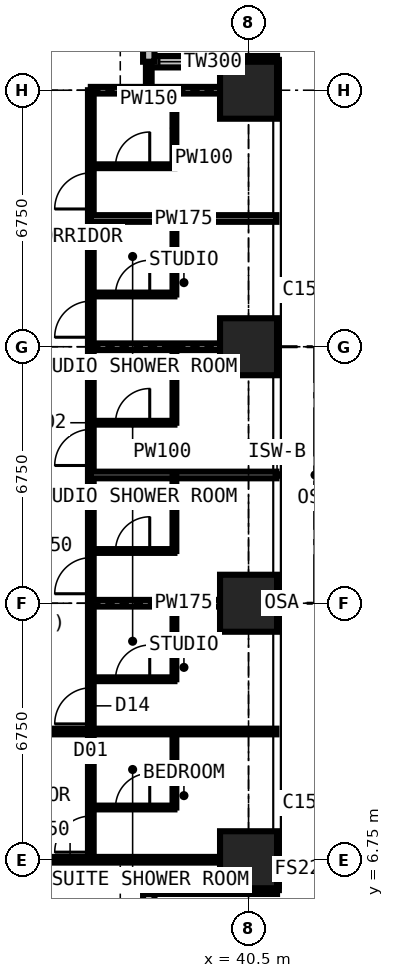
"""IFC4 building model, lengths in metres.
Left out: names, types, materials, properties, quantities, classifications, styles, units other than length and angle.
Written with IfcOpenShell. Run it as: python <this file> out.ifc"""

import sys

from ifc_helpers import new_model, si_unit, direction, frame, frame_2d, origin, origin_2d, place, context, subcontext, project, spatial, rectangle, extrude, element, fill, save


model = new_model("IFC4")
c1 = context("Model", 3, precision=1e-05, world=origin(), true_north=direction((0.0, 1.0)))
c2 = subcontext(c1, "Body", "Model", "MODEL_VIEW")
j1 = project(units=[si_unit("LENGTHUNIT", "METRE"), si_unit("PLANEANGLEUNIT", "RADIAN")], contexts=[c1])
p1 = place(None, origin())
s1 = spatial("IfcSite", under=j1, at=p1, CompositionType="ELEMENT")
p2 = place(p1, origin())
s2 = spatial("IfcBuilding", under=s1, at=p2, CompositionType="ELEMENT")
p3 = place(p2, frame((0.0, 0.0, 126.9)))
s3 = spatial("IfcBuildingStorey", under=s2, at=p3, CompositionType="ELEMENT", Elevation=126.9)
for number, where, z_axis, x_axis in (
    (1, (40.5, 6.75, 0.0), (0.0, 0.0, 1.0), (1.0, 0.0, 0.0)),
    (2, (40.5, 13.5, 0.0), (0.0, 0.0, 1.0), (1.0, 0.0, 0.0)),
    (3, (40.5, 20.25, 0.0), (0.0, 0.0, 1.0), (1.0, 0.0, 0.0)),
    (4, (40.5, 27.0, 0.0), (0.0, 0.0, 1.0), (1.0, 0.0, 0.0)),
):
    element("IfcColumn", number, at=place(p3, frame(where, z_axis=z_axis, x_axis=x_axis)), inside=s3, PredefinedType="COLUMN", context=c2, shape_type="SweptSolid", body=[
        extrude(rectangle(XDim=1.5, YDim=1.5, at=origin_2d()), origin(), (0.0, 0.0, 1.0), 3.6),
    ])
p4 = place(p3, frame((41.25, 27.75, 0.0), z_axis=(0.0, 0.0, 1.0), x_axis=(-1.0, 0.0, 0.0)))
e5 = element("IfcWall", 5, at=p4, inside=s3, PredefinedType="SOLIDWALL", context=c2, shape_type="SweptSolid", body=[
    extrude(rectangle(XDim=3.375, YDim=0.3, at=frame_2d((1.688, 0.0))), origin(), (0.0, 0.0, 1.0), 3.375),
])
p5 = place(p4, frame((1.607, 0.0, 0.9)))
e6 = element("IfcOpeningElement", 6, at=p5, cuts=e5, PredefinedType="OPENING", context=c2, shape_type="SweptSolid", body=[
    extrude(rectangle(XDim=1.5, YDim=1.8, at=frame_2d((0.75, 0.9))), frame((0.0, 0.16, 0.0), z_axis=(0.0, -1.0, 0.0), x_axis=(1.0, 0.0, 0.0)), (0.0, 0.0, 1.0), 0.32),
])
p6 = place(p3, frame((37.875, 27.75, 0.0), z_axis=(0.0, 0.0, 1.0), x_axis=(0.0, 1.0, 0.0)))
e7 = element("IfcWall", 7, at=p6, inside=s3, PredefinedType="SOLIDWALL", context=c2, shape_type="SweptSolid", body=[
    extrude(rectangle(XDim=3.375, YDim=0.3, at=frame_2d((1.688, 0.0))), origin(), (0.0, 0.0, 1.0), 3.375),
])
p7 = place(p6, frame((0.788, 0.0, 0.6)))
e8 = element("IfcOpeningElement", 8, at=p7, cuts=e7, PredefinedType="OPENING", context=c2, shape_type="SweptSolid", body=[
    extrude(rectangle(XDim=1.8, YDim=2.1, at=frame_2d((0.9, 1.05))), frame((0.0, 0.16, 0.0), z_axis=(0.0, -1.0, 0.0), x_axis=(1.0, 0.0, 0.0)), (0.0, 0.0, 1.0), 0.32),
])
p8 = place(p3, frame((37.875, 2.625, 0.0), z_axis=(0.0, 0.0, 1.0), x_axis=(0.0, 1.0, 0.0)))
e9 = element("IfcWall", 9, at=p8, inside=s3, PredefinedType="SOLIDWALL", context=c2, shape_type="SweptSolid", body=[
    extrude(rectangle(XDim=3.375, YDim=0.3, at=frame_2d((1.688, 0.0))), origin(), (0.0, 0.0, 1.0), 3.375),
])
p9 = place(p8, frame((0.788, 0.0, 0.6)))
e10 = element("IfcOpeningElement", 10, at=p9, cuts=e9, PredefinedType="OPENING", context=c2, shape_type="SweptSolid", body=[
    extrude(rectangle(XDim=1.8, YDim=2.1, at=frame_2d((0.9, 1.05))), frame((0.0, 0.16, 0.0), z_axis=(0.0, -1.0, 0.0), x_axis=(1.0, 0.0, 0.0)), (0.0, 0.0, 1.0), 0.32),
])
p10 = place(p3, frame((37.875, 6.0, 0.0), z_axis=(0.0, 0.0, 1.0), x_axis=(1.0, 0.0, 0.0)))
e11 = element("IfcWall", 11, at=p10, inside=s3, PredefinedType="SOLIDWALL", context=c2, shape_type="SweptSolid", body=[
    extrude(rectangle(XDim=3.375, YDim=0.3, at=frame_2d((1.688, 0.0))), origin(), (0.0, 0.0, 1.0), 3.375),
])
p11 = place(p10, frame((0.268, 0.0, 0.9)))
e12 = element("IfcOpeningElement", 12, at=p11, cuts=e11, PredefinedType="OPENING", context=c2, shape_type="SweptSolid", body=[
    extrude(rectangle(XDim=1.5, YDim=1.8, at=frame_2d((0.75, 0.9))), frame((0.0, 0.16, 0.0), z_axis=(0.0, -1.0, 0.0), x_axis=(1.0, 0.0, 0.0)), (0.0, 0.0, 1.0), 0.32),
])
p12 = place(p3, frame((30.375, 6.75, 0.0), z_axis=(0.0, 0.0, 1.0), x_axis=(1.0, 0.0, 0.0)))
e13 = element("IfcWall", 13, at=p12, inside=s3, PredefinedType="PARTITIONING", context=c2, shape_type="SweptSolid", body=[
    extrude(rectangle(XDim=10.859, YDim=0.15, at=frame_2d((5.429, 0.0))), origin(), (0.0, 0.0, 1.0), 2.877),
])
p13 = place(p12, frame((1.6, 0.0, 0.0)))
e14 = element("IfcOpeningElement", 14, at=p13, cuts=e13, PredefinedType="OPENING", context=c2, shape_type="SweptSolid", body=[
    extrude(rectangle(XDim=1.0, YDim=2.2, at=frame_2d((0.5, 1.1))), frame((0.0, 0.085, 0.0), z_axis=(0.0, -1.0, 0.0), x_axis=(1.0, 0.0, 0.0)), (0.0, 0.0, 1.0), 0.17),
])
p14 = place(p3, frame((30.375, 10.125, 0.0), z_axis=(0.0, 0.0, 1.0), x_axis=(1.0, 0.0, 0.0)))
e15 = element("IfcWall", 15, at=p14, inside=s3, PredefinedType="PARTITIONING", context=c2, shape_type="SweptSolid", body=[
    extrude(rectangle(XDim=10.859, YDim=0.15, at=frame_2d((5.429, 0.0))), origin(), (0.0, 0.0, 1.0), 3.375),
])
p15 = place(p14, frame((2.5, 0.0, 0.0)))
e16 = element("IfcOpeningElement", 16, at=p15, cuts=e15, PredefinedType="OPENING", context=c2, shape_type="SweptSolid", body=[
    extrude(rectangle(XDim=1.0, YDim=2.2, at=frame_2d((0.5, 1.1))), frame((0.0, 0.085, 0.0), z_axis=(0.0, -1.0, 0.0), x_axis=(1.0, 0.0, 0.0)), (0.0, 0.0, 1.0), 0.17),
])
p16 = place(p3, frame((36.35, 6.75, 0.0), z_axis=(0.0, 0.0, 1.0), x_axis=(0.0, 1.0, 0.0)))
e17 = element("IfcWall", 17, at=p16, inside=s3, PredefinedType="PARTITIONING", context=c2, shape_type="SweptSolid", body=[
    extrude(rectangle(XDim=20.25, YDim=0.15, at=frame_2d((10.125, 0.0))), origin(), (0.0, 0.0, 1.0), 3.375),
])
p17 = place(p16, frame((0.2, 0.0, 0.0)))
e18 = element("IfcOpeningElement", 18, at=p17, cuts=e17, PredefinedType="OPENING", context=c2, shape_type="SweptSolid", body=[
    extrude(rectangle(XDim=0.95, YDim=2.2, at=frame_2d((0.475, 1.1))), frame((0.0, 0.085, 0.0), z_axis=(0.0, -1.0, 0.0), x_axis=(1.0, 0.0, 0.0)), (0.0, 0.0, 1.0), 0.17),
])
p18 = place(p16, frame((3.575, 0.0, 0.0)))
e19 = element("IfcOpeningElement", 19, at=p18, cuts=e17, PredefinedType="OPENING", context=c2, shape_type="SweptSolid", body=[
    extrude(rectangle(XDim=0.95, YDim=2.2, at=frame_2d((0.475, 1.1))), frame((0.0, 0.085, 0.0), z_axis=(0.0, -1.0, 0.0), x_axis=(1.0, 0.0, 0.0)), (0.0, 0.0, 1.0), 0.17),
])
p19 = place(p16, frame((7.0, 0.0, 0.0)))
e20 = element("IfcOpeningElement", 20, at=p19, cuts=e17, PredefinedType="OPENING", context=c2, shape_type="SweptSolid", body=[
    extrude(rectangle(XDim=0.95, YDim=2.2, at=frame_2d((0.475, 1.1))), frame((0.0, 0.085, 0.0), z_axis=(0.0, -1.0, 0.0), x_axis=(1.0, 0.0, 0.0)), (0.0, 0.0, 1.0), 0.17),
])
p20 = place(p16, frame((10.375, 0.0, 0.0)))
e21 = element("IfcOpeningElement", 21, at=p20, cuts=e17, PredefinedType="OPENING", context=c2, shape_type="SweptSolid", body=[
    extrude(rectangle(XDim=0.95, YDim=2.2, at=frame_2d((0.475, 1.1))), frame((0.0, 0.085, 0.0), z_axis=(0.0, -1.0, 0.0), x_axis=(1.0, 0.0, 0.0)), (0.0, 0.0, 1.0), 0.17),
])
p21 = place(p16, frame((13.75, 0.0, 0.0)))
e22 = element("IfcOpeningElement", 22, at=p21, cuts=e17, PredefinedType="OPENING", context=c2, shape_type="SweptSolid", body=[
    extrude(rectangle(XDim=0.95, YDim=2.2, at=frame_2d((0.475, 1.1))), frame((0.0, 0.085, 0.0), z_axis=(0.0, -1.0, 0.0), x_axis=(1.0, 0.0, 0.0)), (0.0, 0.0, 1.0), 0.17),
])
p22 = place(p16, frame((17.125, 0.0, 0.0)))
e23 = element("IfcOpeningElement", 23, at=p22, cuts=e17, PredefinedType="OPENING", context=c2, shape_type="SweptSolid", body=[
    extrude(rectangle(XDim=0.95, YDim=2.2, at=frame_2d((0.475, 1.1))), frame((0.0, 0.085, 0.0), z_axis=(0.0, -1.0, 0.0), x_axis=(1.0, 0.0, 0.0)), (0.0, 0.0, 1.0), 0.17),
])
p23 = place(p3, frame((36.35, 8.125, 0.0), z_axis=(0.0, 0.0, 1.0), x_axis=(1.0, 0.0, 0.0)))
e24 = element("IfcWall", 24, at=p23, inside=s3, PredefinedType="PARTITIONING", context=c2, shape_type="SweptSolid", body=[
    extrude(rectangle(XDim=2.2, YDim=0.1, at=frame_2d((1.1, 0.0))), origin(), (0.0, 0.0, 1.0), 3.375),
])
p24 = place(p23, frame((0.65, 0.0, 0.0)))
e25 = element("IfcOpeningElement", 25, at=p24, cuts=e24, PredefinedType="OPENING", context=c2, shape_type="SweptSolid", body=[
    extrude(rectangle(XDim=0.9, YDim=2.2, at=frame_2d((0.45, 1.1))), frame((0.0, 0.06, 0.0), z_axis=(0.0, -1.0, 0.0), x_axis=(1.0, 0.0, 0.0)), (0.0, 0.0, 1.0), 0.12),
])
p25 = place(p3, frame((36.35, 11.5, 0.0), z_axis=(0.0, 0.0, 1.0), x_axis=(1.0, 0.0, 0.0)))
e26 = element("IfcWall", 26, at=p25, inside=s3, PredefinedType="PARTITIONING", context=c2, shape_type="SweptSolid", body=[
    extrude(rectangle(XDim=2.2, YDim=0.1, at=frame_2d((1.1, 0.0))), origin(), (0.0, 0.0, 1.0), 3.375),
])
p26 = place(p25, frame((0.65, 0.0, 0.0)))
e27 = element("IfcOpeningElement", 27, at=p26, cuts=e26, PredefinedType="OPENING", context=c2, shape_type="SweptSolid", body=[
    extrude(rectangle(XDim=0.9, YDim=2.2, at=frame_2d((0.45, 1.1))), frame((0.0, 0.06, 0.0), z_axis=(0.0, -1.0, 0.0), x_axis=(1.0, 0.0, 0.0)), (0.0, 0.0, 1.0), 0.12),
])
p27 = place(p3, frame((36.35, 13.5, 0.0), z_axis=(0.0, 0.0, 1.0), x_axis=(1.0, 0.0, 0.0)))
e28 = element("IfcWall", 28, at=p27, inside=s3, PredefinedType="PARTITIONING", context=c2, shape_type="SweptSolid", body=[
    extrude(rectangle(XDim=4.884, YDim=0.175, at=frame_2d((2.442, 0.0))), origin(), (0.0, 0.0, 1.0), 2.61),
])
p28 = place(p3, frame((36.35, 14.875, 0.0), z_axis=(0.0, 0.0, 1.0), x_axis=(1.0, 0.0, 0.0)))
e29 = element("IfcWall", 29, at=p28, inside=s3, PredefinedType="PARTITIONING", context=c2, shape_type="SweptSolid", body=[
    extrude(rectangle(XDim=2.2, YDim=0.1, at=frame_2d((1.1, 0.0))), origin(), (0.0, 0.0, 1.0), 3.375),
])
p29 = place(p28, frame((0.65, 0.0, 0.0)))
e30 = element("IfcOpeningElement", 30, at=p29, cuts=e29, PredefinedType="OPENING", context=c2, shape_type="SweptSolid", body=[
    extrude(rectangle(XDim=0.9, YDim=2.2, at=frame_2d((0.45, 1.1))), frame((0.0, 0.06, 0.0), z_axis=(0.0, -1.0, 0.0), x_axis=(1.0, 0.0, 0.0)), (0.0, 0.0, 1.0), 0.12),
])
p30 = place(p3, frame((36.35, 16.875, 0.0), z_axis=(0.0, 0.0, 1.0), x_axis=(1.0, 0.0, 0.0)))
e31 = element("IfcWall", 31, at=p30, inside=s3, PredefinedType="PARTITIONING", context=c2, shape_type="SweptSolid", body=[
    extrude(rectangle(XDim=4.884, YDim=0.175, at=frame_2d((2.442, 0.0))), origin(), (0.0, 0.0, 1.0), 3.375),
])
p31 = place(p3, frame((36.35, 18.25, 0.0), z_axis=(0.0, 0.0, 1.0), x_axis=(1.0, 0.0, 0.0)))
e32 = element("IfcWall", 32, at=p31, inside=s3, PredefinedType="PARTITIONING", context=c2, shape_type="SweptSolid", body=[
    extrude(rectangle(XDim=2.2, YDim=0.1, at=frame_2d((1.1, 0.0))), origin(), (0.0, 0.0, 1.0), 3.375),
])
p32 = place(p31, frame((0.65, 0.0, 0.0)))
e33 = element("IfcOpeningElement", 33, at=p32, cuts=e32, PredefinedType="OPENING", context=c2, shape_type="SweptSolid", body=[
    extrude(rectangle(XDim=0.9, YDim=2.2, at=frame_2d((0.45, 1.1))), frame((0.0, 0.06, 0.0), z_axis=(0.0, -1.0, 0.0), x_axis=(1.0, 0.0, 0.0)), (0.0, 0.0, 1.0), 0.12),
])
p33 = place(p3, frame((36.35, 20.25, 0.0), z_axis=(0.0, 0.0, 1.0), x_axis=(1.0, 0.0, 0.0)))
e34 = element("IfcWall", 34, at=p33, inside=s3, PredefinedType="PARTITIONING", context=c2, shape_type="SweptSolid", body=[
    extrude(rectangle(XDim=4.884, YDim=0.175, at=frame_2d((2.442, 0.0))), origin(), (0.0, 0.0, 1.0), 2.61),
])
p34 = place(p3, frame((36.35, 21.625, 0.0), z_axis=(0.0, 0.0, 1.0), x_axis=(1.0, 0.0, 0.0)))
e35 = element("IfcWall", 35, at=p34, inside=s3, PredefinedType="PARTITIONING", context=c2, shape_type="SweptSolid", body=[
    extrude(rectangle(XDim=2.2, YDim=0.1, at=frame_2d((1.1, 0.0))), origin(), (0.0, 0.0, 1.0), 3.375),
])
p35 = place(p34, frame((0.65, 0.0, 0.0)))
e36 = element("IfcOpeningElement", 36, at=p35, cuts=e35, PredefinedType="OPENING", context=c2, shape_type="SweptSolid", body=[
    extrude(rectangle(XDim=0.9, YDim=2.2, at=frame_2d((0.45, 1.1))), frame((0.0, 0.06, 0.0), z_axis=(0.0, -1.0, 0.0), x_axis=(1.0, 0.0, 0.0)), (0.0, 0.0, 1.0), 0.12),
])
p36 = place(p3, frame((36.35, 23.625, 0.0), z_axis=(0.0, 0.0, 1.0), x_axis=(1.0, 0.0, 0.0)))
e37 = element("IfcWall", 37, at=p36, inside=s3, PredefinedType="PARTITIONING", context=c2, shape_type="SweptSolid", body=[
    extrude(rectangle(XDim=4.884, YDim=0.175, at=frame_2d((2.442, 0.0))), origin(), (0.0, 0.0, 1.0), 3.375),
])
p37 = place(p3, frame((36.35, 25.0, 0.0), z_axis=(0.0, 0.0, 1.0), x_axis=(1.0, 0.0, 0.0)))
e38 = element("IfcWall", 38, at=p37, inside=s3, PredefinedType="PARTITIONING", context=c2, shape_type="SweptSolid", body=[
    extrude(rectangle(XDim=2.2, YDim=0.1, at=frame_2d((1.1, 0.0))), origin(), (0.0, 0.0, 1.0), 3.375),
])
p38 = place(p37, frame((0.65, 0.0, 0.0)))
e39 = element("IfcOpeningElement", 39, at=p38, cuts=e38, PredefinedType="OPENING", context=c2, shape_type="SweptSolid", body=[
    extrude(rectangle(XDim=0.9, YDim=2.2, at=frame_2d((0.45, 1.1))), frame((0.0, 0.06, 0.0), z_axis=(0.0, -1.0, 0.0), x_axis=(1.0, 0.0, 0.0)), (0.0, 0.0, 1.0), 0.12),
])
p39 = place(p3, frame((36.35, 27.0, 0.0), z_axis=(0.0, 0.0, 1.0), x_axis=(1.0, 0.0, 0.0)))
e40 = element("IfcWall", 40, at=p39, inside=s3, PredefinedType="PARTITIONING", context=c2, shape_type="SweptSolid", body=[
    extrude(rectangle(XDim=4.884, YDim=0.175, at=frame_2d((2.442, 0.0))), origin(), (0.0, 0.0, 1.0), 2.877),
])
p40 = place(p3, frame((37.875, 27.0, 0.0), z_axis=(0.0, 0.0, 1.0), x_axis=(0.0, 1.0, 0.0)))
e41 = element("IfcWall", 41, at=p40, inside=s3, PredefinedType="PARTITIONING", context=c2, shape_type="SweptSolid", body=[
    extrude(rectangle(XDim=0.734, YDim=0.15, at=frame_2d((0.367, 0.0))), origin(), (0.0, 0.0, 1.0), 3.375),
])
for number, where, z_axis, x_axis in (
    (42, (38.55, 8.125, 0.0), (0.0, 0.0, 1.0), (0.0, 1.0, 0.0)),
    (43, (38.55, 11.5, 0.0), (0.0, 0.0, 1.0), (0.0, 1.0, 0.0)),
    (44, (38.55, 14.875, 0.0), (0.0, 0.0, 1.0), (0.0, 1.0, 0.0)),
    (45, (38.55, 18.25, 0.0), (0.0, 0.0, 1.0), (0.0, 1.0, 0.0)),
    (46, (38.55, 21.625, 0.0), (0.0, 0.0, 1.0), (0.0, 1.0, 0.0)),
    (47, (38.55, 25.0, 0.0), (0.0, 0.0, 1.0), (0.0, 1.0, 0.0)),
):
    element("IfcWall", number, at=place(p3, frame(where, z_axis=z_axis, x_axis=x_axis)), inside=s3, PredefinedType="PARTITIONING", context=c2, shape_type="SweptSolid", body=[
        extrude(rectangle(XDim=2.0, YDim=0.1, at=frame_2d((1.0, 0.0))), origin(), (0.0, 0.0, 1.0), 3.375),
    ])
p41 = place(p5, origin())
e48 = element("IfcWindow", 48, at=p41, inside=s3, PartitioningType="SINGLE_PANEL", PredefinedType="WINDOW", context=c2, shape_type="SweptSolid", body=[
    extrude(rectangle(XDim=1.5, YDim=1.8, at=frame_2d((0.75, 0.9))), frame((0.0, 0.03, 0.0), z_axis=(0.0, -1.0, 0.0), x_axis=(1.0, 0.0, 0.0)), (0.0, 0.0, 1.0), 0.06),
])
fill(e6, e48)
p42 = place(p11, origin())
e49 = element("IfcWindow", 49, at=p42, inside=s3, PartitioningType="SINGLE_PANEL", PredefinedType="WINDOW", context=c2, shape_type="SweptSolid", body=[
    extrude(rectangle(XDim=1.5, YDim=1.8, at=frame_2d((0.75, 0.9))), frame((0.0, 0.03, 0.0), z_axis=(0.0, -1.0, 0.0), x_axis=(1.0, 0.0, 0.0)), (0.0, 0.0, 1.0), 0.06),
])
fill(e12, e49)
p43 = place(p17, origin())
e50 = element("IfcDoor", 50, at=p43, inside=s3, OperationType="SINGLE_SWING_LEFT", PredefinedType="DOOR", context=c2, shape_type="SweptSolid", body=[
    extrude(rectangle(XDim=0.95, YDim=2.2, at=frame_2d((0.475, 1.1))), frame((0.0, 0.025, 0.0), z_axis=(0.0, -1.0, 0.0), x_axis=(1.0, 0.0, 0.0)), (0.0, 0.0, 1.0), 0.05),
])
fill(e18, e50)
p44 = place(p24, origin())
e51 = element("IfcDoor", 51, at=p44, inside=s3, OperationType="SINGLE_SWING_RIGHT", PredefinedType="DOOR", context=c2, shape_type="SweptSolid", body=[
    extrude(rectangle(XDim=0.9, YDim=2.2, at=frame_2d((0.45, 1.1))), frame((0.0, 0.025, 0.0), z_axis=(0.0, -1.0, 0.0), x_axis=(1.0, 0.0, 0.0)), (0.0, 0.0, 1.0), 0.05),
])
fill(e25, e51)
p45 = place(p18, origin())
e52 = element("IfcDoor", 52, at=p45, inside=s3, OperationType="SINGLE_SWING_LEFT", PredefinedType="DOOR", context=c2, shape_type="SweptSolid", body=[
    extrude(rectangle(XDim=0.95, YDim=2.2, at=frame_2d((0.475, 1.1))), frame((0.0, 0.025, 0.0), z_axis=(0.0, -1.0, 0.0), x_axis=(1.0, 0.0, 0.0)), (0.0, 0.0, 1.0), 0.05),
])
fill(e19, e52)
p46 = place(p26, origin())
e53 = element("IfcDoor", 53, at=p46, inside=s3, OperationType="SINGLE_SWING_RIGHT", PredefinedType="DOOR", context=c2, shape_type="SweptSolid", body=[
    extrude(rectangle(XDim=0.9, YDim=2.2, at=frame_2d((0.45, 1.1))), frame((0.0, 0.025, 0.0), z_axis=(0.0, -1.0, 0.0), x_axis=(1.0, 0.0, 0.0)), (0.0, 0.0, 1.0), 0.05),
])
fill(e27, e53)
p47 = place(p19, origin())
e54 = element("IfcDoor", 54, at=p47, inside=s3, OperationType="SINGLE_SWING_LEFT", PredefinedType="DOOR", context=c2, shape_type="SweptSolid", body=[
    extrude(rectangle(XDim=0.95, YDim=2.2, at=frame_2d((0.475, 1.1))), frame((0.0, 0.025, 0.0), z_axis=(0.0, -1.0, 0.0), x_axis=(1.0, 0.0, 0.0)), (0.0, 0.0, 1.0), 0.05),
])
fill(e20, e54)
p48 = place(p29, origin())
e55 = element("IfcDoor", 55, at=p48, inside=s3, OperationType="SINGLE_SWING_RIGHT", PredefinedType="DOOR", context=c2, shape_type="SweptSolid", body=[
    extrude(rectangle(XDim=0.9, YDim=2.2, at=frame_2d((0.45, 1.1))), frame((0.0, 0.025, 0.0), z_axis=(0.0, -1.0, 0.0), x_axis=(1.0, 0.0, 0.0)), (0.0, 0.0, 1.0), 0.05),
])
fill(e30, e55)
p49 = place(p20, origin())
e56 = element("IfcDoor", 56, at=p49, inside=s3, OperationType="SINGLE_SWING_LEFT", PredefinedType="DOOR", context=c2, shape_type="SweptSolid", body=[
    extrude(rectangle(XDim=0.95, YDim=2.2, at=frame_2d((0.475, 1.1))), frame((0.0, 0.025, 0.0), z_axis=(0.0, -1.0, 0.0), x_axis=(1.0, 0.0, 0.0)), (0.0, 0.0, 1.0), 0.05),
])
fill(e21, e56)
p50 = place(p32, origin())
e57 = element("IfcDoor", 57, at=p50, inside=s3, OperationType="SINGLE_SWING_RIGHT", PredefinedType="DOOR", context=c2, shape_type="SweptSolid", body=[
    extrude(rectangle(XDim=0.9, YDim=2.2, at=frame_2d((0.45, 1.1))), frame((0.0, 0.025, 0.0), z_axis=(0.0, -1.0, 0.0), x_axis=(1.0, 0.0, 0.0)), (0.0, 0.0, 1.0), 0.05),
])
fill(e33, e57)
p51 = place(p21, origin())
e58 = element("IfcDoor", 58, at=p51, inside=s3, OperationType="SINGLE_SWING_LEFT", PredefinedType="DOOR", context=c2, shape_type="SweptSolid", body=[
    extrude(rectangle(XDim=0.95, YDim=2.2, at=frame_2d((0.475, 1.1))), frame((0.0, 0.025, 0.0), z_axis=(0.0, -1.0, 0.0), x_axis=(1.0, 0.0, 0.0)), (0.0, 0.0, 1.0), 0.05),
])
fill(e22, e58)
p52 = place(p35, origin())
e59 = element("IfcDoor", 59, at=p52, inside=s3, OperationType="SINGLE_SWING_RIGHT", PredefinedType="DOOR", context=c2, shape_type="SweptSolid", body=[
    extrude(rectangle(XDim=0.9, YDim=2.2, at=frame_2d((0.45, 1.1))), frame((0.0, 0.025, 0.0), z_axis=(0.0, -1.0, 0.0), x_axis=(1.0, 0.0, 0.0)), (0.0, 0.0, 1.0), 0.05),
])
fill(e36, e59)
p53 = place(p22, origin())
e60 = element("IfcDoor", 60, at=p53, inside=s3, OperationType="SINGLE_SWING_LEFT", PredefinedType="DOOR", context=c2, shape_type="SweptSolid", body=[
    extrude(rectangle(XDim=0.95, YDim=2.2, at=frame_2d((0.475, 1.1))), frame((0.0, 0.025, 0.0), z_axis=(0.0, -1.0, 0.0), x_axis=(1.0, 0.0, 0.0)), (0.0, 0.0, 1.0), 0.05),
])
fill(e23, e60)
p54 = place(p38, origin())
e61 = element("IfcDoor", 61, at=p54, inside=s3, OperationType="SINGLE_SWING_RIGHT", PredefinedType="DOOR", context=c2, shape_type="SweptSolid", body=[
    extrude(rectangle(XDim=0.9, YDim=2.2, at=frame_2d((0.45, 1.1))), frame((0.0, 0.025, 0.0), z_axis=(0.0, -1.0, 0.0), x_axis=(1.0, 0.0, 0.0)), (0.0, 0.0, 1.0), 0.05),
])
fill(e39, e61)
save(model, sys.argv[1])
